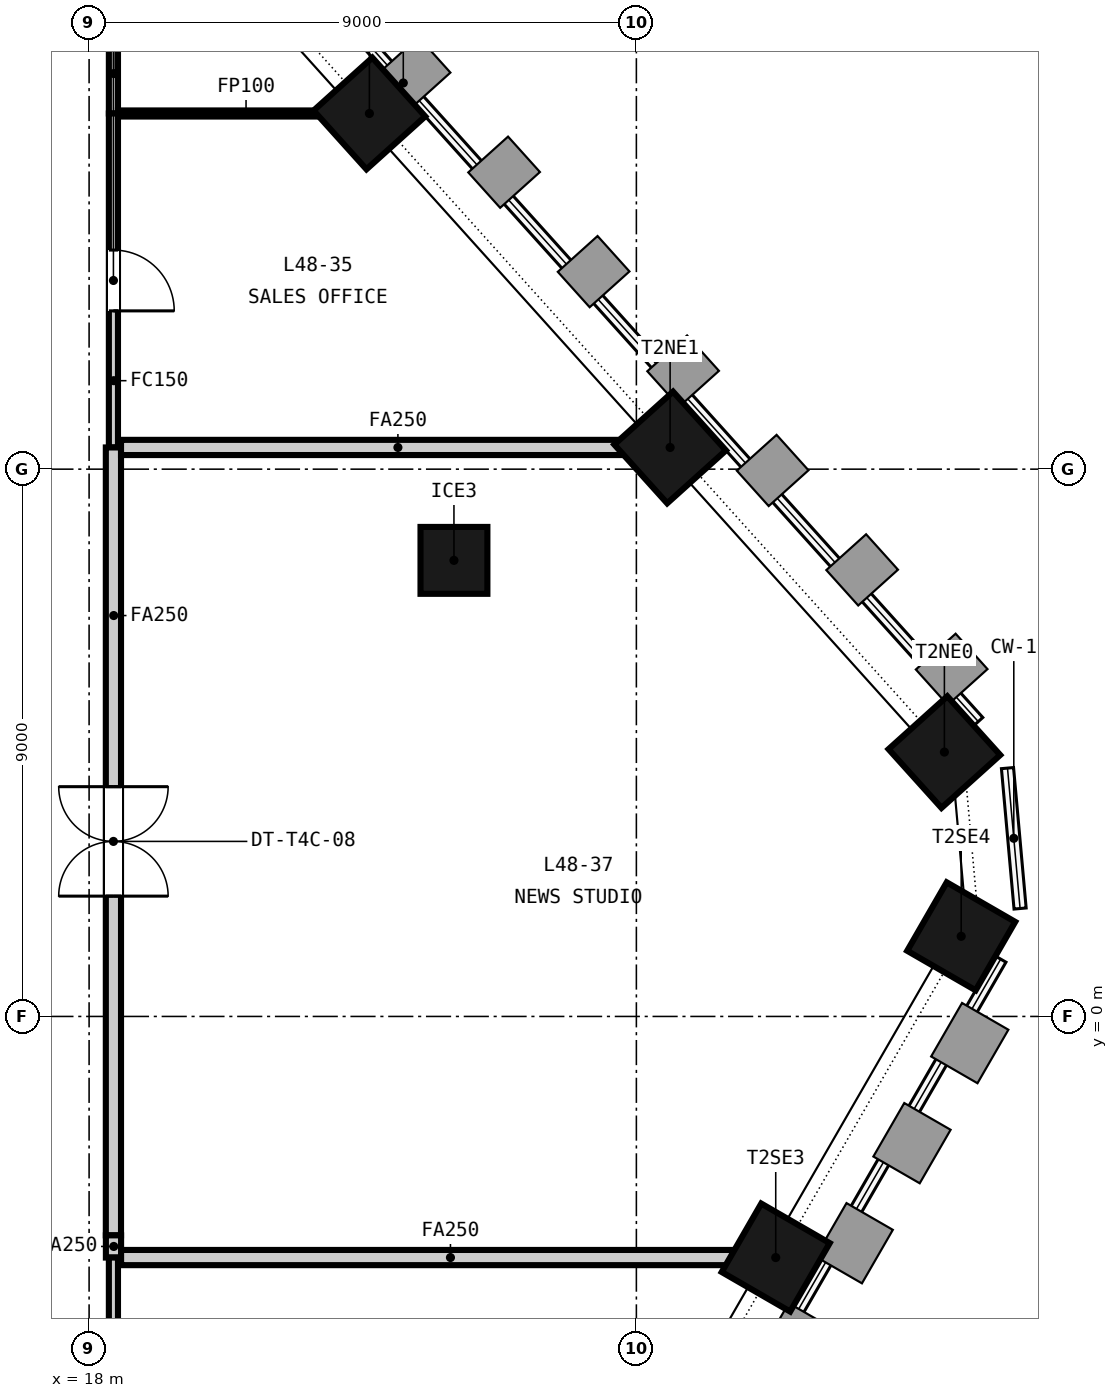
"""IFC4 building model, lengths in metres.
Left out: names, types, materials, properties, quantities, classifications, styles, units other than length and angle.
Written with IfcOpenShell. Run it as: python <this file> out.ifc"""

import sys

from ifc_helpers import new_model, si_unit, direction, frame, frame_2d, origin, origin_2d, place, context, subcontext, project, spatial, rectangle, extrude, element, fill, save


model = new_model("IFC4")
c1 = context("Model", 3, precision=1e-05, world=origin(), true_north=direction((0.0, 1.0)))
c2 = subcontext(c1, "Body", "Model", "MODEL_VIEW")
j1 = project(units=[si_unit("LENGTHUNIT", "METRE"), si_unit("PLANEANGLEUNIT", "RADIAN")], contexts=[c1])
p1 = place(None, origin())
s1 = spatial("IfcSite", under=j1, at=p1, CompositionType="ELEMENT")
p2 = place(p1, origin())
s2 = spatial("IfcBuilding", under=s1, at=p2, CompositionType="ELEMENT")
p3 = place(p2, frame((0.0, 0.0, 192.7)))
s3 = spatial("IfcBuildingStorey", under=s2, at=p3, CompositionType="ELEMENT", Elevation=192.7)
for number, where, z_axis, x_axis in (
    (1, (29.292, -3.965, -0.15), (0.0, 0.0, 1.0), (0.5, 0.866, 0.0)),
    (2, (32.342, 1.318, -0.15), (0.0, 0.0, 1.0), (0.5, 0.866, 0.0)),
    (3, (32.065, 4.347, -0.15), (0.0, 0.0, 1.0), (-0.669, 0.743, 0.0)),
    (4, (27.555, 9.357, -0.15), (0.0, 0.0, 1.0), (-0.669, 0.743, 0.0)),
    (5, (22.61, 14.849, -0.15), (0.0, 0.0, 1.0), (-0.669, 0.743, 0.0)),
):
    element("IfcColumn", number, at=place(p3, frame(where, z_axis=z_axis, x_axis=x_axis)), inside=s3, PredefinedType="COLUMN", context=c2, shape_type="SweptSolid", body=[
        extrude(rectangle(XDim=1.3, YDim=1.3, at=origin_2d()), origin(), (0.0, 0.0, 1.0), 3.65),
    ])
p4 = place(p3, frame((24.0, 7.5, -0.15), z_axis=(0.0, 0.0, 1.0), x_axis=(1.0, 0.0, 0.0)))
e6 = element("IfcColumn", 6, at=p4, inside=s3, PredefinedType="COLUMN", context=c2, shape_type="SweptSolid", body=[
    extrude(rectangle(XDim=1.1, YDim=1.1, at=origin_2d()), origin(), (0.0, 0.0, 1.0), 3.65),
])
p5 = place(p3, frame((18.4, 16.162, 0.0), z_axis=(0.0, 0.0, 1.0), x_axis=(0.0, -1.0, 0.0)))
e7 = element("IfcWall", 7, at=p5, inside=s3, PredefinedType="PARTITIONING", context=c2, shape_type="SweptSolid", body=[
    extrude(rectangle(XDim=1.313, YDim=0.15, at=frame_2d((0.656, 0.0))), origin(), (0.0, 0.0, 1.0), 2.741),
])
p6 = place(p3, frame((18.4, 14.849, 0.0), z_axis=(0.0, 0.0, 1.0), x_axis=(0.0, -1.0, 0.0)))
e8 = element("IfcWall", 8, at=p6, inside=s3, PredefinedType="PARTITIONING", context=c2, shape_type="SweptSolid", body=[
    extrude(rectangle(XDim=5.492, YDim=0.15, at=frame_2d((2.746, 0.0))), origin(), (0.0, 0.0, 1.0), 2.741),
])
p7 = place(p6, frame((2.246, 0.0, 0.0)))
e9 = element("IfcOpeningElement", 9, at=p7, cuts=e8, PredefinedType="OPENING", context=c2, shape_type="SweptSolid", body=[
    extrude(rectangle(XDim=1.0, YDim=2.1, at=frame_2d((0.5, 1.05))), frame((0.0, 0.085, 0.0), z_axis=(0.0, -1.0, 0.0), x_axis=(1.0, 0.0, 0.0)), (0.0, 0.0, 1.0), 0.17),
])
p8 = place(p3, frame((18.4, 9.357, 0.0), z_axis=(0.0, 0.0, 1.0), x_axis=(0.0, -1.0, 0.0)))
e10 = element("IfcWall", 10, at=p8, inside=s3, PredefinedType="PARTITIONING", context=c2, shape_type="SweptSolid", body=[
    extrude(rectangle(XDim=12.957, YDim=0.25, at=frame_2d((6.479, 0.0))), origin(), (0.0, 0.0, 1.0), 2.741),
])
p9 = place(p8, frame((5.579, 0.0, 0.0)))
e11 = element("IfcOpeningElement", 11, at=p9, cuts=e10, PredefinedType="OPENING", context=c2, shape_type="SweptSolid", body=[
    extrude(rectangle(XDim=1.8, YDim=2.1, at=frame_2d((0.9, 1.05))), frame((0.0, 0.135, 0.0), z_axis=(0.0, -1.0, 0.0), x_axis=(1.0, 0.0, 0.0)), (0.0, 0.0, 1.0), 0.27),
])
p10 = place(p3, frame((18.401, -3.6, 0.0), z_axis=(0.0, 0.0, 1.0), x_axis=(0.0, -1.0, 0.0)))
e12 = element("IfcWall", 12, at=p10, inside=s3, PredefinedType="PARTITIONING", context=c2, shape_type="SweptSolid", body=[
    extrude(rectangle(XDim=0.365, YDim=0.25, at=frame_2d((0.183, 0.0))), origin(), (0.0, 0.0, 1.0), 2.741),
])
p11 = place(p3, frame((18.4, -3.965, 0.0), z_axis=(0.0, 0.0, 1.0), x_axis=(0.0, -1.0, 0.0)))
e13 = element("IfcWall", 13, at=p11, inside=s3, PredefinedType="PARTITIONING", context=c2, shape_type="SweptSolid", body=[
    extrude(rectangle(XDim=11.585, YDim=0.15, at=frame_2d((5.792, 0.0))), origin(), (0.0, 0.0, 1.0), 2.741),
])
p12 = place(p11, frame((3.921, 0.0, 0.0)))
e14 = element("IfcOpeningElement", 14, at=p12, cuts=e13, PredefinedType="OPENING", context=c2, shape_type="SweptSolid", body=[
    extrude(rectangle(XDim=1.0, YDim=2.1, at=frame_2d((0.5, 1.05))), frame((0.0, 0.085, 0.0), z_axis=(0.0, -1.0, 0.0), x_axis=(1.0, 0.0, 0.0)), (0.0, 0.0, 1.0), 0.17),
])
p13 = place(p3, frame((18.475, 14.849, 0.0), z_axis=(0.0, 0.0, 1.0), x_axis=(1.0, 0.0, 0.0)))
e15 = element("IfcWall", 15, at=p13, inside=s3, PredefinedType="PARTITIONING", context=c2, shape_type="SweptSolid", body=[
    extrude(rectangle(XDim=4.202, YDim=0.1, at=frame_2d((2.101, 0.0))), origin(), (0.0, 0.0, 1.0), 2.741),
])
p14 = place(p3, frame((18.525, 9.357, 0.0), z_axis=(0.0, 0.0, 1.0), x_axis=(1.0, 0.0, 0.0)))
e16 = element("IfcWall", 16, at=p14, inside=s3, PredefinedType="PARTITIONING", context=c2, shape_type="SweptSolid", body=[
    extrude(rectangle(XDim=9.097, YDim=0.25, at=frame_2d((4.549, 0.0))), origin(), (0.0, 0.0, 1.0), 2.741),
])
p15 = place(p3, frame((18.526, -3.965, 0.0), z_axis=(0.0, 0.0, 1.0), x_axis=(1.0, 0.0, 0.0)))
e17 = element("IfcWall", 17, at=p15, inside=s3, PredefinedType="PARTITIONING", context=c2, shape_type="SweptSolid", body=[
    extrude(rectangle(XDim=10.823, YDim=0.25, at=frame_2d((5.412, 0.0))), origin(), (0.0, 0.0, 1.0), 2.741),
])
p16 = place(p7, origin())
e18 = element("IfcDoor", 18, at=p16, inside=s3, OperationType="SINGLE_SWING_RIGHT", PredefinedType="DOOR", context=c2, shape_type="SweptSolid", body=[
    extrude(rectangle(XDim=1.0, YDim=2.1, at=frame_2d((0.5, 1.05))), frame((0.0, 0.025, 0.0), z_axis=(0.0, -1.0, 0.0), x_axis=(1.0, 0.0, 0.0)), (0.0, 0.0, 1.0), 0.05),
])
fill(e9, e18)
p17 = place(p9, origin())
e19 = element("IfcDoor", 19, at=p17, inside=s3, OperationType="DOUBLE_DOOR_DOUBLE_SWING", PredefinedType="DOOR", context=c2, shape_type="SweptSolid", body=[
    extrude(rectangle(XDim=1.8, YDim=2.1, at=frame_2d((0.9, 1.05))), frame((0.0, 0.025, 0.0), z_axis=(0.0, -1.0, 0.0), x_axis=(1.0, 0.0, 0.0)), (0.0, 0.0, 1.0), 0.05),
])
fill(e11, e19)
save(model, sys.argv[1])
